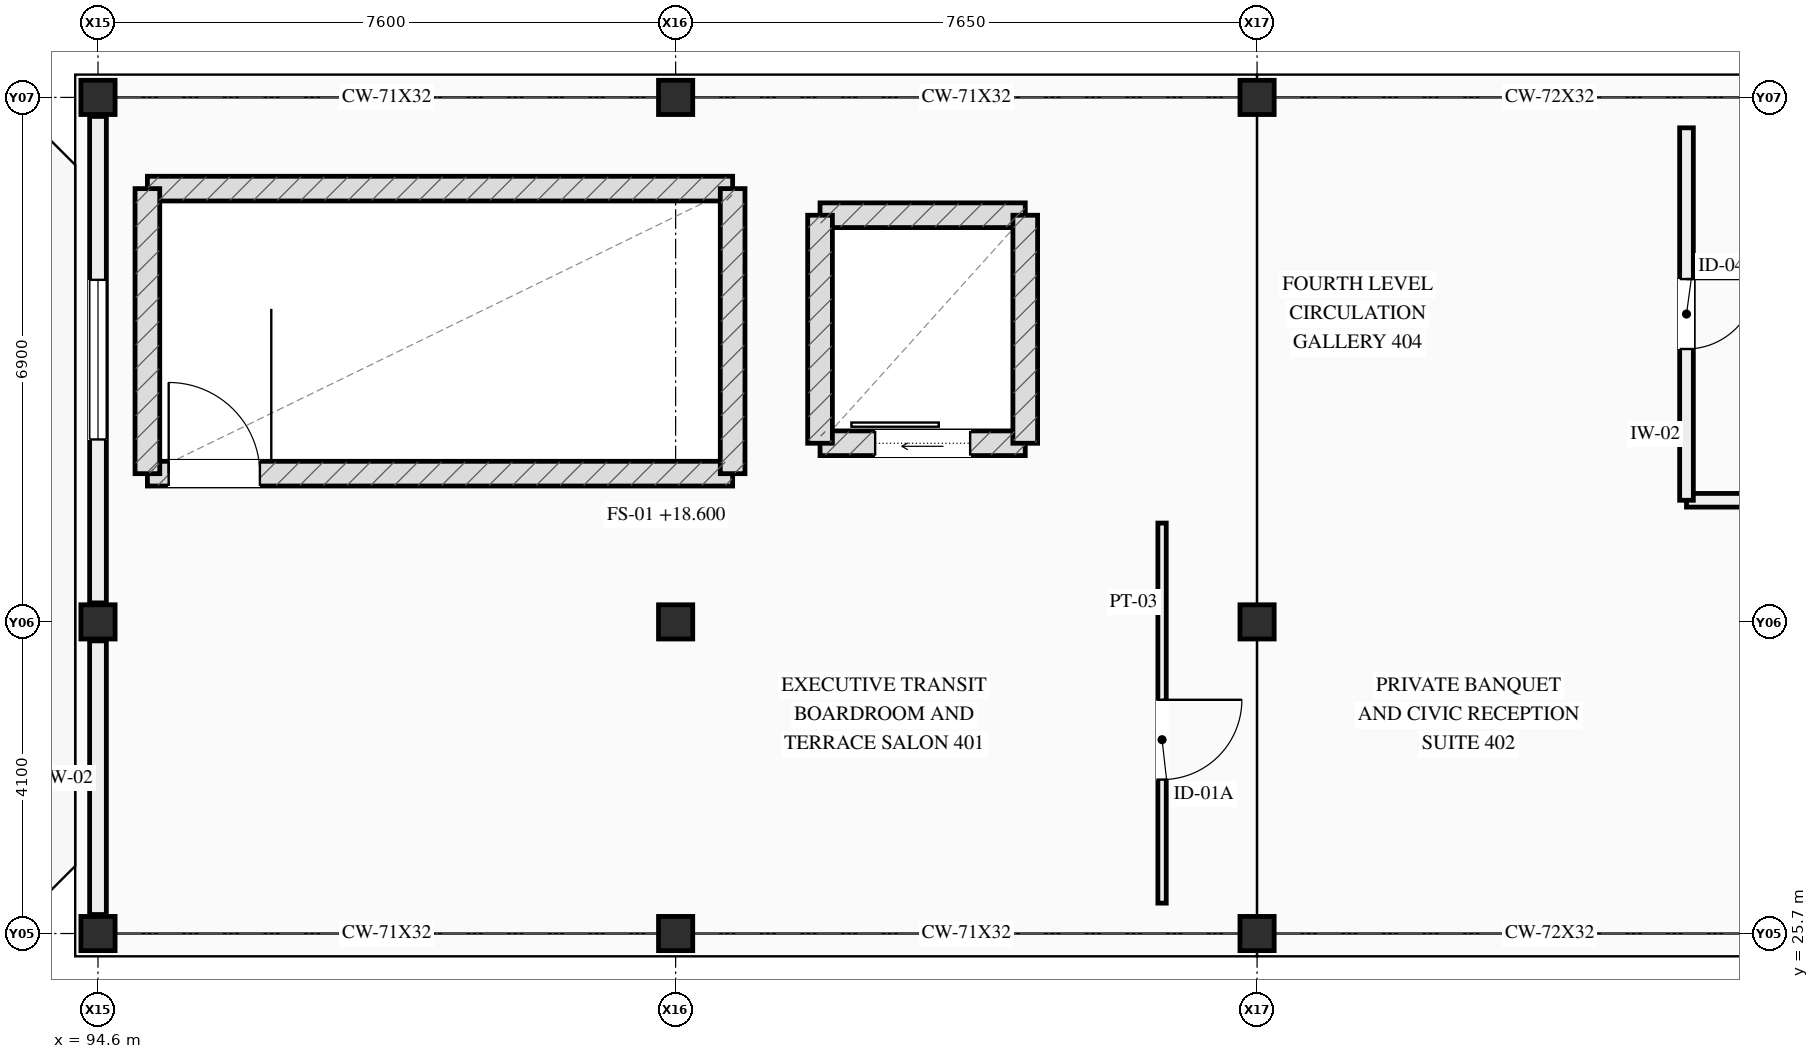
"""IFC4 building model, lengths in metres.
Left out: names, types, materials, properties, quantities, classifications, styles, units other than length and angle.
Written with IfcOpenShell. Run it as: python <this file> out.ifc"""

import sys

from ifc_helpers import new_model, si_unit, direction, frame, frame_2d, origin, origin_2d, place, context, subcontext, project, spatial, rectangle, extrude, element, fill, save


model = new_model("IFC4")
c1 = context("Model", 3, precision=1e-05, world=origin(), true_north=direction((0.0, 1.0)))
c2 = subcontext(c1, "Body", "Model", "MODEL_VIEW")
j1 = project(units=[si_unit("LENGTHUNIT", "METRE"), si_unit("PLANEANGLEUNIT", "RADIAN")], contexts=[c1])
p1 = place(None, origin())
s1 = spatial("IfcSite", under=j1, at=p1, CompositionType="ELEMENT")
p2 = place(p1, origin())
s2 = spatial("IfcBuilding", under=s1, at=p2, CompositionType="ELEMENT")
p3 = place(p2, frame((0.0, 0.0, 18.6)))
s3 = spatial("IfcBuildingStorey", under=s2, at=p3, CompositionType="ELEMENT", Elevation=18.6)
for number, where, z_axis, x_axis in (
    (1, (94.6, 25.7, 0.0), (0.0, 0.0, 1.0), (1.0, 0.0, 0.0)),
    (2, (94.6, 29.8, 0.0), (0.0, 0.0, 1.0), (1.0, 0.0, 0.0)),
    (3, (94.6, 36.7, 0.0), (0.0, 0.0, 1.0), (1.0, 0.0, 0.0)),
    (4, (102.2, 25.7, 0.0), (0.0, 0.0, 1.0), (1.0, 0.0, 0.0)),
    (5, (102.2, 29.8, 0.0), (0.0, 0.0, 1.0), (1.0, 0.0, 0.0)),
    (6, (102.2, 36.7, 0.0), (0.0, 0.0, 1.0), (1.0, 0.0, 0.0)),
    (7, (109.85, 25.7, 0.0), (0.0, 0.0, 1.0), (1.0, 0.0, 0.0)),
    (8, (109.85, 29.8, 0.0), (0.0, 0.0, 1.0), (1.0, 0.0, 0.0)),
    (9, (109.85, 36.7, 0.0), (0.0, 0.0, 1.0), (1.0, 0.0, 0.0)),
):
    element("IfcColumn", number, at=place(p3, frame(where, z_axis=z_axis, x_axis=x_axis)), inside=s3, PredefinedType="COLUMN", context=c2, shape_type="SweptSolid", body=[
        extrude(rectangle(XDim=0.45, YDim=0.45, at=origin_2d()), origin(), (0.0, 0.0, 1.0), 4.2),
    ])
p4 = place(p3, frame((94.6, 25.95, 0.0), z_axis=(0.0, 0.0, 1.0), x_axis=(0.0, 1.0, 0.0)))
e10 = element("IfcWall", 10, at=p4, inside=s3, PredefinedType="STANDARD", context=c2, shape_type="SweptSolid", body=[
    extrude(rectangle(XDim=3.6, YDim=0.22, at=frame_2d((1.8, 0.0))), origin(), (0.0, 0.0, 1.0), 3.28),
])
p5 = place(p3, frame((94.6, 30.05, 0.0), z_axis=(0.0, 0.0, 1.0), x_axis=(0.0, 1.0, 0.0)))
e11 = element("IfcWall", 11, at=p5, inside=s3, PredefinedType="STANDARD", context=c2, shape_type="SweptSolid", body=[
    extrude(rectangle(XDim=6.4, YDim=0.22, at=frame_2d((3.2, 0.0))), origin(), (0.0, 0.0, 1.0), 3.28),
])
p6 = place(p5, frame((2.15, 0.0, 0.98)))
e12 = element("IfcOpeningElement", 12, at=p6, cuts=e11, PredefinedType="OPENING", context=c2, shape_type="SweptSolid", body=[
    extrude(rectangle(XDim=2.1, YDim=1.3, at=frame_2d((1.05, 0.65))), frame((0.0, 0.12, 0.0), z_axis=(0.0, -1.0, 0.0), x_axis=(1.0, 0.0, 0.0)), (0.0, 0.0, 1.0), 0.24),
])
p7 = place(p3, frame((95.25, 31.75, 0.0), z_axis=(0.0, 0.0, 1.0), x_axis=(1.0, 0.0, 0.0)))
e13 = element("IfcWall", 13, at=p7, inside=s3, PredefinedType="SHEAR", context=c2, shape_type="SweptSolid", body=[
    extrude(rectangle(XDim=7.7, YDim=0.325, at=frame_2d((3.85, 0.0))), origin(), (0.0, 0.0, 1.0), 3.99),
])
p8 = place(p7, frame((0.28, 0.0, 0.0)))
e14 = element("IfcOpeningElement", 14, at=p8, cuts=e13, PredefinedType="OPENING", context=c2, shape_type="SweptSolid", body=[
    extrude(rectangle(XDim=1.2, YDim=2.2, at=frame_2d((0.6, 1.1))), frame((0.0, 0.172, 0.0), z_axis=(0.0, -1.0, 0.0), x_axis=(1.0, 0.0, 0.0)), (0.0, 0.0, 1.0), 0.345),
])
p9 = place(p3, frame((102.95, 35.5, 0.0), z_axis=(0.0, 0.0, 1.0), x_axis=(-1.0, 0.0, 0.0)))
e15 = element("IfcWall", 15, at=p9, inside=s3, PredefinedType="SHEAR", context=c2, shape_type="SweptSolid", body=[
    extrude(rectangle(XDim=7.7, YDim=0.325, at=frame_2d((3.85, 0.0))), origin(), (0.0, 0.0, 1.0), 3.99),
])
for number, where, z_axis, x_axis in (
    (16, (95.25, 35.5, 0.0), (0.0, 0.0, 1.0), (0.0, -1.0, 0.0)),
    (17, (102.95, 31.75, 0.0), (0.0, 0.0, 1.0), (0.0, 1.0, 0.0)),
):
    element("IfcWall", number, at=place(p3, frame(where, z_axis=z_axis, x_axis=x_axis)), inside=s3, PredefinedType="SHEAR", context=c2, shape_type="SweptSolid", body=[
        extrude(rectangle(XDim=3.75, YDim=0.325, at=frame_2d((1.875, 0.0))), origin(), (0.0, 0.0, 1.0), 3.99),
    ])
p10 = place(p3, frame((104.1, 32.15, 0.0), z_axis=(0.0, 0.0, 1.0), x_axis=(1.0, 0.0, 0.0)))
e18 = element("IfcWall", 18, at=p10, inside=s3, PredefinedType="SHEAR", context=c2, shape_type="SweptSolid", body=[
    extrude(rectangle(XDim=2.7, YDim=0.325, at=frame_2d((1.35, 0.0))), origin(), (0.0, 0.0, 1.0), 4.005),
])
p11 = place(p10, frame((0.725, 0.0, 0.0)))
e19 = element("IfcOpeningElement", 19, at=p11, cuts=e18, PredefinedType="OPENING", context=c2, shape_type="SweptSolid", body=[
    extrude(rectangle(XDim=1.25, YDim=2.2, at=frame_2d((0.625, 1.1))), frame((0.0, 0.172, 0.0), z_axis=(0.0, -1.0, 0.0), x_axis=(1.0, 0.0, 0.0)), (0.0, 0.0, 1.0), 0.345),
])
p12 = place(p3, frame((104.1, 35.15, 0.0), z_axis=(0.0, 0.0, 1.0), x_axis=(1.0, 0.0, 0.0)))
e20 = element("IfcWall", 20, at=p12, inside=s3, PredefinedType="SHEAR", context=c2, shape_type="SweptSolid", body=[
    extrude(rectangle(XDim=2.7, YDim=0.325, at=frame_2d((1.35, 0.0))), origin(), (0.0, 0.0, 1.0), 4.005),
])
for number, where, z_axis, x_axis in (
    (21, (104.1, 32.15, 0.0), (0.0, 0.0, 1.0), (0.0, 1.0, 0.0)),
    (22, (106.8, 32.15, 0.0), (0.0, 0.0, 1.0), (0.0, 1.0, 0.0)),
):
    element("IfcWall", number, at=place(p3, frame(where, z_axis=z_axis, x_axis=x_axis)), inside=s3, PredefinedType="SHEAR", context=c2, shape_type="SweptSolid", body=[
        extrude(rectangle(XDim=3.0, YDim=0.325, at=frame_2d((1.5, 0.0))), origin(), (0.0, 0.0, 1.0), 4.005),
    ])
p13 = place(p3, frame((108.6, 26.1, 0.0), z_axis=(0.0, 0.0, 1.0), x_axis=(0.0, 1.0, 0.0)))
e23 = element("IfcWall", 23, at=p13, inside=s3, PredefinedType="MOVABLE", context=c2, shape_type="SweptSolid", body=[
    extrude(rectangle(XDim=5.0, YDim=0.11, at=frame_2d((2.5, 0.0))), origin(), (0.0, 0.0, 1.0), 3.05),
])
p14 = place(p13, frame((1.625, 0.0, 0.0)))
e24 = element("IfcOpeningElement", 24, at=p14, cuts=e23, PredefinedType="OPENING", context=c2, shape_type="SweptSolid", body=[
    extrude(rectangle(XDim=1.05, YDim=2.2, at=frame_2d((0.525, 1.1))), frame((0.0, 0.065, 0.0), z_axis=(0.0, -1.0, 0.0), x_axis=(1.0, 0.0, 0.0)), (0.0, 0.0, 1.0), 0.13),
])
p15 = place(p3, frame((115.5, 31.4, 0.0), z_axis=(0.0, 0.0, 1.0), x_axis=(1.0, 0.0, 0.0)))
e25 = element("IfcWall", 25, at=p15, inside=s3, PredefinedType="PLUMBINGWALL", context=c2, shape_type="SweptSolid", body=[
    extrude(rectangle(XDim=4.7, YDim=0.18, at=frame_2d((2.35, 0.0))), origin(), (0.0, 0.0, 1.0), 3.05),
])
p16 = place(p3, frame((115.5, 31.4, 0.0), z_axis=(0.0, 0.0, 1.0), x_axis=(0.0, 1.0, 0.0)))
e26 = element("IfcWall", 26, at=p16, inside=s3, PredefinedType="PLUMBINGWALL", context=c2, shape_type="SweptSolid", body=[
    extrude(rectangle(XDim=4.9, YDim=0.18, at=frame_2d((2.45, 0.0))), origin(), (0.0, 0.0, 1.0), 3.05),
])
p17 = place(p16, frame((1.99, 0.0, 0.0)))
e27 = element("IfcOpeningElement", 27, at=p17, cuts=e26, PredefinedType="OPENING", context=c2, shape_type="SweptSolid", body=[
    extrude(rectangle(XDim=0.92, YDim=2.1, at=frame_2d((0.46, 1.05))), frame((0.0, 0.1, 0.0), z_axis=(0.0, -1.0, 0.0), x_axis=(1.0, 0.0, 0.0)), (0.0, 0.0, 1.0), 0.2),
])
p18 = place(p6, origin())
e28 = element("IfcWindow", 28, at=p18, inside=s3, PartitioningType="SINGLE_PANEL", PredefinedType="WINDOW", context=c2, shape_type="SweptSolid", body=[
    extrude(rectangle(XDim=2.1, YDim=1.3, at=frame_2d((1.05, 0.65))), frame((0.0, 0.03, 0.0), z_axis=(0.0, -1.0, 0.0), x_axis=(1.0, 0.0, 0.0)), (0.0, 0.0, 1.0), 0.06),
])
fill(e12, e28)
p19 = place(p8, origin())
e29 = element("IfcDoor", 29, at=p19, inside=s3, OperationType="SINGLE_SWING_LEFT", PredefinedType="DOOR", context=c2, shape_type="SweptSolid", body=[
    extrude(rectangle(XDim=1.2, YDim=2.2, at=frame_2d((0.6, 1.1))), frame((0.0, 0.025, 0.0), z_axis=(0.0, -1.0, 0.0), x_axis=(1.0, 0.0, 0.0)), (0.0, 0.0, 1.0), 0.05),
])
fill(e14, e29)
p20 = place(p11, origin())
e30 = element("IfcDoor", 30, at=p20, inside=s3, OperationType="SLIDING_TO_LEFT", PredefinedType="DOOR", context=c2, shape_type="SweptSolid", body=[
    extrude(rectangle(XDim=1.25, YDim=2.2, at=frame_2d((0.625, 1.1))), frame((0.0, 0.025, 0.0), z_axis=(0.0, -1.0, 0.0), x_axis=(1.0, 0.0, 0.0)), (0.0, 0.0, 1.0), 0.05),
])
fill(e19, e30)
p21 = place(p14, origin())
e31 = element("IfcDoor", 31, at=p21, inside=s3, OperationType="SINGLE_SWING_RIGHT", PredefinedType="DOOR", context=c2, shape_type="SweptSolid", body=[
    extrude(rectangle(XDim=1.05, YDim=2.2, at=frame_2d((0.525, 1.1))), frame((0.0, 0.025, 0.0), z_axis=(0.0, -1.0, 0.0), x_axis=(1.0, 0.0, 0.0)), (0.0, 0.0, 1.0), 0.05),
])
fill(e24, e31)
p22 = place(p17, origin())
e32 = element("IfcDoor", 32, at=p22, inside=s3, OperationType="SINGLE_SWING_RIGHT", PredefinedType="DOOR", context=c2, shape_type="SweptSolid", body=[
    extrude(rectangle(XDim=0.92, YDim=2.1, at=frame_2d((0.46, 1.05))), frame((0.0, 0.025, 0.0), z_axis=(0.0, -1.0, 0.0), x_axis=(1.0, 0.0, 0.0)), (0.0, 0.0, 1.0), 0.05),
])
fill(e27, e32)
save(model, sys.argv[1])
